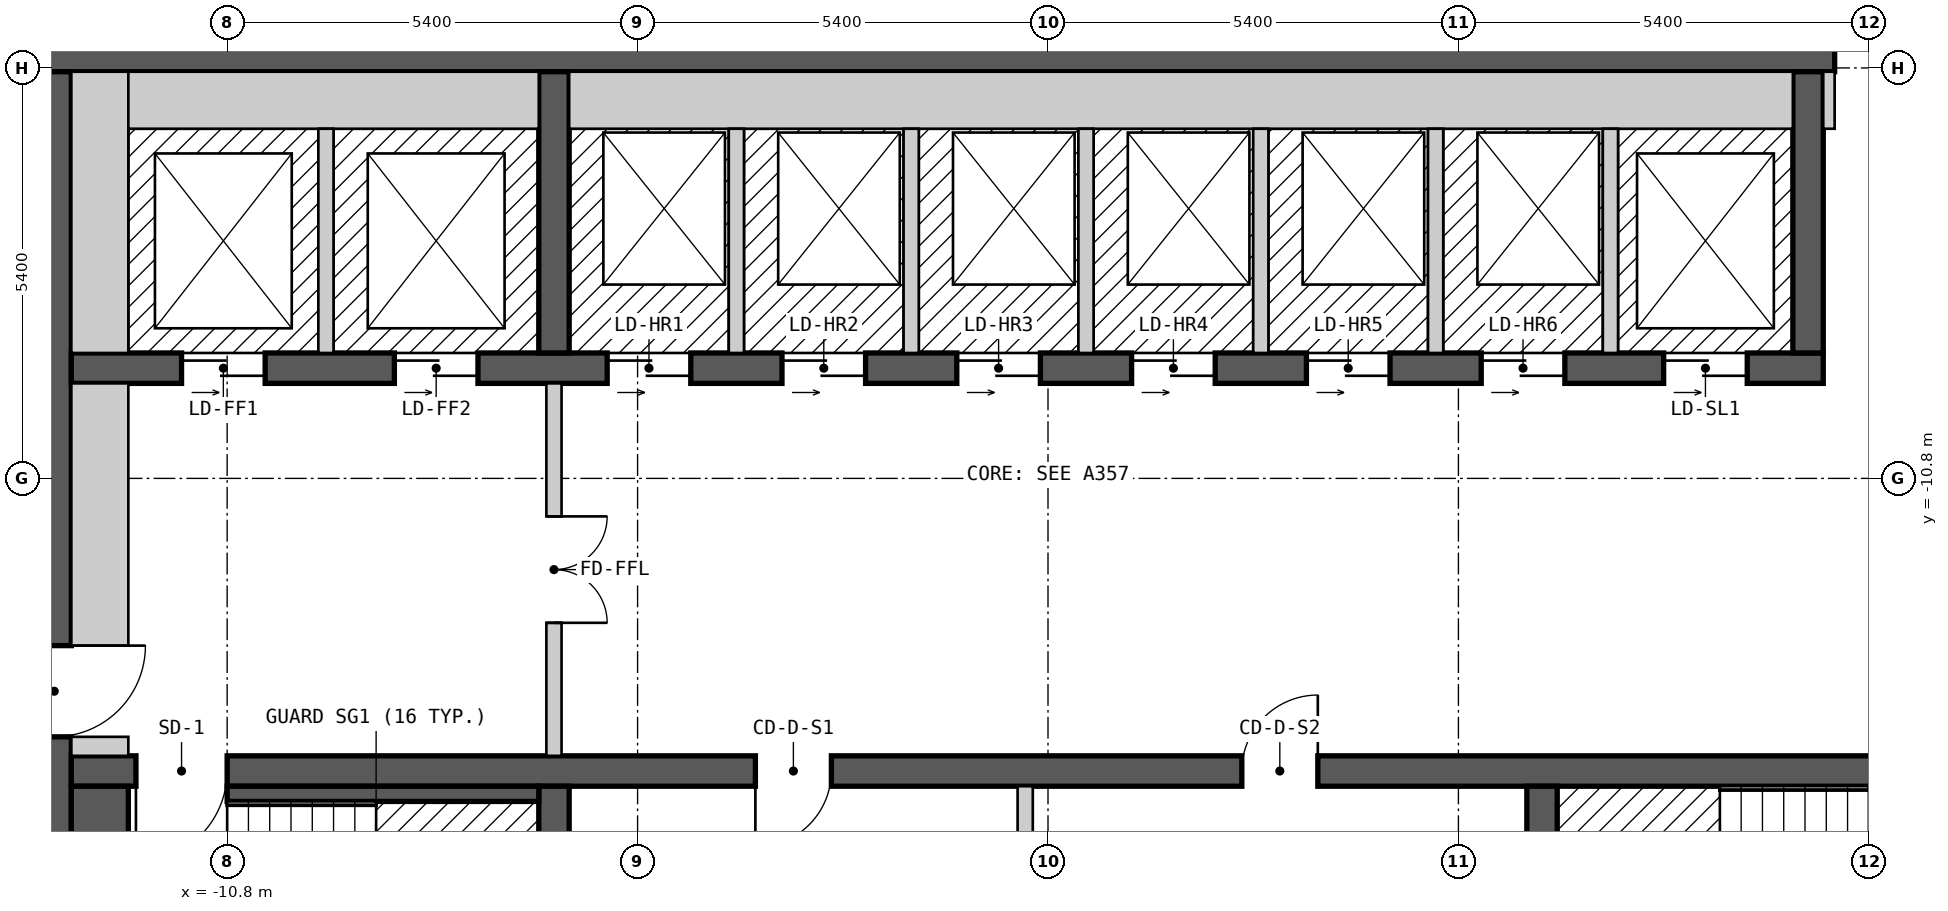
"""IFC4 building model, lengths in metres.
Left out: names, types, materials, properties, quantities, classifications, styles, units other than length and angle.
Written with IfcOpenShell. Run it as: python <this file> out.ifc"""

import sys

from ifc_helpers import new_model, si_unit, direction, frame, frame_2d, origin, place, context, subcontext, project, spatial, rectangle, extrude, element, fill, save


model = new_model("IFC4")
c1 = context("Model", 3, precision=1e-05, world=origin(), true_north=direction((0.0, 1.0)))
c2 = subcontext(c1, "Body", "Model", "MODEL_VIEW")
j1 = project(units=[si_unit("LENGTHUNIT", "METRE"), si_unit("PLANEANGLEUNIT", "RADIAN")], contexts=[c1])
p1 = place(None, origin())
s1 = spatial("IfcSite", under=j1, at=p1, CompositionType="ELEMENT")
p2 = place(p1, origin())
s2 = spatial("IfcBuilding", under=s1, at=p2, CompositionType="ELEMENT")
p3 = place(p2, frame((0.0, 0.0, 208.8)))
s3 = spatial("IfcBuildingStorey", under=s2, at=p3, CompositionType="ELEMENT", Elevation=208.8)
p4 = place(p3, frame((-13.3, -5.225, 0.0), z_axis=(0.0, 0.0, 1.0), x_axis=(1.0, 0.0, 0.0)))
e1 = element("IfcWall", 1, at=p4, inside=s3, PredefinedType="SHEAR", context=c2, shape_type="SweptSolid", body=[
    extrude(rectangle(XDim=26.6, YDim=0.45, at=frame_2d((13.3, 0.0))), origin(), (0.0, 0.0, 1.0), 2.7),
])
p5 = place(p4, frame((23.65, 0.0, 0.0)))
e2 = element("IfcOpeningElement", 2, at=p5, cuts=e1, PredefinedType="OPENING", context=c2, shape_type="SweptSolid", body=[
    extrude(rectangle(XDim=1.2, YDim=2.1, at=frame_2d((0.6, 1.05))), frame((0.0, 0.235, 0.0), z_axis=(0.0, -1.0, 0.0), x_axis=(1.0, 0.0, 0.0)), (0.0, 0.0, 1.0), 0.47),
])
p6 = place(p3, frame((-13.075, -18.55, 0.0), z_axis=(0.0, 0.0, 1.0), x_axis=(0.0, 1.0, 0.0)))
e3 = element("IfcWall", 3, at=p6, inside=s3, PredefinedType="SHEAR", context=c2, shape_type="SweptSolid", body=[
    extrude(rectangle(XDim=13.1, YDim=0.45, at=frame_2d((6.55, 0.0))), origin(), (0.0, 0.0, 1.0), 2.7),
])
p7 = place(p6, frame((4.35, 0.0, 0.0)))
e4 = element("IfcOpeningElement", 4, at=p7, cuts=e3, PredefinedType="OPENING", context=c2, shape_type="SweptSolid", body=[
    extrude(rectangle(XDim=1.2, YDim=2.1, at=frame_2d((0.6, 1.05))), frame((0.0, 0.235, 0.0), z_axis=(0.0, -1.0, 0.0), x_axis=(1.0, 0.0, 0.0)), (0.0, 0.0, 1.0), 0.47),
])
p8 = place(p3, frame((-12.85, -14.65, 0.0), z_axis=(0.0, 0.0, 1.0), x_axis=(1.0, 0.0, 0.0)))
e5 = element("IfcWall", 5, at=p8, inside=s3, PredefinedType="SHEAR", context=c2, shape_type="SweptSolid", body=[
    extrude(rectangle(XDim=25.7, YDim=0.4, at=frame_2d((12.85, 0.0))), origin(), (0.0, 0.0, 1.0), 2.7),
])
p9 = place(p8, frame((2.05, 0.0, 0.0), z_axis=(0.0, 0.0, 1.0), x_axis=(-1.0, 0.0, 0.0)))
e6 = element("IfcOpeningElement", 6, at=p9, cuts=e5, PredefinedType="OPENING", context=c2, shape_type="SweptSolid", body=[
    extrude(rectangle(XDim=1.2, YDim=2.1, at=frame_2d((0.6, 1.05))), frame((0.0, 0.21, 0.0), z_axis=(0.0, -1.0, 0.0), x_axis=(1.0, 0.0, 0.0)), (0.0, 0.0, 1.0), 0.42),
])
p10 = place(p8, frame((24.9, 0.0, 0.0), z_axis=(0.0, 0.0, 1.0), x_axis=(-1.0, 0.0, 0.0)))
e7 = element("IfcOpeningElement", 7, at=p10, cuts=e5, PredefinedType="OPENING", context=c2, shape_type="SweptSolid", body=[
    extrude(rectangle(XDim=1.2, YDim=2.1, at=frame_2d((0.6, 1.05))), frame((0.0, 0.21, 0.0), z_axis=(0.0, -1.0, 0.0), x_axis=(1.0, 0.0, 0.0)), (0.0, 0.0, 1.0), 0.42),
])
p11 = place(p8, frame((10.0, 0.0, 0.0), z_axis=(0.0, 0.0, 1.0), x_axis=(-1.0, 0.0, 0.0)))
e8 = element("IfcOpeningElement", 8, at=p11, cuts=e5, PredefinedType="OPENING", context=c2, shape_type="SweptSolid", body=[
    extrude(rectangle(XDim=1.0, YDim=2.1, at=frame_2d((0.5, 1.05))), frame((0.0, 0.21, 0.0), z_axis=(0.0, -1.0, 0.0), x_axis=(1.0, 0.0, 0.0)), (0.0, 0.0, 1.0), 0.42),
])
p12 = place(p8, frame((16.4, 0.0, 0.0), z_axis=(0.0, 0.0, 1.0), x_axis=(-1.0, 0.0, 0.0)))
e9 = element("IfcOpeningElement", 9, at=p12, cuts=e5, PredefinedType="OPENING", context=c2, shape_type="SweptSolid", body=[
    extrude(rectangle(XDim=1.0, YDim=2.1, at=frame_2d((0.5, 1.05))), frame((0.0, 0.21, 0.0), z_axis=(0.0, -1.0, 0.0), x_axis=(1.0, 0.0, 0.0)), (0.0, 0.0, 1.0), 0.42),
])
p13 = place(p3, frame((-12.85, -9.35, 0.0), z_axis=(0.0, 0.0, 1.0), x_axis=(1.0, 0.0, 0.0)))
e10 = element("IfcWall", 10, at=p13, inside=s3, PredefinedType="SHEAR", context=c2, shape_type="SweptSolid", body=[
    extrude(rectangle(XDim=23.05, YDim=0.4, at=frame_2d((11.525, 0.0))), origin(), (0.0, 0.0, 1.0), 2.7),
])
p14 = place(p13, frame((1.45, 0.0, 0.0)))
e11 = element("IfcOpeningElement", 11, at=p14, cuts=e10, PredefinedType="OPENING", context=c2, shape_type="SweptSolid", body=[
    extrude(rectangle(XDim=1.1, YDim=2.1, at=frame_2d((0.55, 1.05))), frame((0.0, 0.21, 0.0), z_axis=(0.0, -1.0, 0.0), x_axis=(1.0, 0.0, 0.0)), (0.0, 0.0, 1.0), 0.42),
])
p15 = place(p13, frame((4.25, 0.0, 0.0)))
e12 = element("IfcOpeningElement", 12, at=p15, cuts=e10, PredefinedType="OPENING", context=c2, shape_type="SweptSolid", body=[
    extrude(rectangle(XDim=1.1, YDim=2.1, at=frame_2d((0.55, 1.05))), frame((0.0, 0.21, 0.0), z_axis=(0.0, -1.0, 0.0), x_axis=(1.0, 0.0, 0.0)), (0.0, 0.0, 1.0), 0.42),
])
p16 = place(p13, frame((7.05, 0.0, 0.0)))
e13 = element("IfcOpeningElement", 13, at=p16, cuts=e10, PredefinedType="OPENING", context=c2, shape_type="SweptSolid", body=[
    extrude(rectangle(XDim=1.1, YDim=2.1, at=frame_2d((0.55, 1.05))), frame((0.0, 0.21, 0.0), z_axis=(0.0, -1.0, 0.0), x_axis=(1.0, 0.0, 0.0)), (0.0, 0.0, 1.0), 0.42),
])
p17 = place(p13, frame((9.35, 0.0, 0.0)))
e14 = element("IfcOpeningElement", 14, at=p17, cuts=e10, PredefinedType="OPENING", context=c2, shape_type="SweptSolid", body=[
    extrude(rectangle(XDim=1.1, YDim=2.1, at=frame_2d((0.55, 1.05))), frame((0.0, 0.21, 0.0), z_axis=(0.0, -1.0, 0.0), x_axis=(1.0, 0.0, 0.0)), (0.0, 0.0, 1.0), 0.42),
])
p18 = place(p13, frame((11.65, 0.0, 0.0)))
e15 = element("IfcOpeningElement", 15, at=p18, cuts=e10, PredefinedType="OPENING", context=c2, shape_type="SweptSolid", body=[
    extrude(rectangle(XDim=1.1, YDim=2.1, at=frame_2d((0.55, 1.05))), frame((0.0, 0.21, 0.0), z_axis=(0.0, -1.0, 0.0), x_axis=(1.0, 0.0, 0.0)), (0.0, 0.0, 1.0), 0.42),
])
p19 = place(p13, frame((13.95, 0.0, 0.0)))
e16 = element("IfcOpeningElement", 16, at=p19, cuts=e10, PredefinedType="OPENING", context=c2, shape_type="SweptSolid", body=[
    extrude(rectangle(XDim=1.1, YDim=2.1, at=frame_2d((0.55, 1.05))), frame((0.0, 0.21, 0.0), z_axis=(0.0, -1.0, 0.0), x_axis=(1.0, 0.0, 0.0)), (0.0, 0.0, 1.0), 0.42),
])
p20 = place(p13, frame((16.25, 0.0, 0.0)))
e17 = element("IfcOpeningElement", 17, at=p20, cuts=e10, PredefinedType="OPENING", context=c2, shape_type="SweptSolid", body=[
    extrude(rectangle(XDim=1.1, YDim=2.1, at=frame_2d((0.55, 1.05))), frame((0.0, 0.21, 0.0), z_axis=(0.0, -1.0, 0.0), x_axis=(1.0, 0.0, 0.0)), (0.0, 0.0, 1.0), 0.42),
])
p21 = place(p13, frame((18.55, 0.0, 0.0)))
e18 = element("IfcOpeningElement", 18, at=p21, cuts=e10, PredefinedType="OPENING", context=c2, shape_type="SweptSolid", body=[
    extrude(rectangle(XDim=1.1, YDim=2.1, at=frame_2d((0.55, 1.05))), frame((0.0, 0.21, 0.0), z_axis=(0.0, -1.0, 0.0), x_axis=(1.0, 0.0, 0.0)), (0.0, 0.0, 1.0), 0.42),
])
p22 = place(p13, frame((20.95, 0.0, 0.0)))
e19 = element("IfcOpeningElement", 19, at=p22, cuts=e10, PredefinedType="OPENING", context=c2, shape_type="SweptSolid", body=[
    extrude(rectangle(XDim=1.1, YDim=2.1, at=frame_2d((0.55, 1.05))), frame((0.0, 0.21, 0.0), z_axis=(0.0, -1.0, 0.0), x_axis=(1.0, 0.0, 0.0)), (0.0, 0.0, 1.0), 0.42),
])
for number, where, z_axis, x_axis in (
    (20, (-6.5, -18.55, 0.0), (0.0, 0.0, 1.0), (0.0, 1.0, 0.0)),
    (21, (6.5, -18.55, 0.0), (0.0, 0.0, 1.0), (0.0, 1.0, 0.0)),
    (22, (-6.5, -9.15, 0.0), (0.0, 0.0, 1.0), (0.0, 1.0, 0.0)),
    (23, (10.0, -9.15, 0.0), (0.0, 0.0, 1.0), (0.0, 1.0, 0.0)),
):
    element("IfcWall", number, at=place(p3, frame(where, z_axis=z_axis, x_axis=x_axis)), inside=s3, PredefinedType="SHEAR", context=c2, shape_type="SweptSolid", body=[
        extrude(rectangle(XDim=3.7, YDim=0.4, at=frame_2d((1.85, 0.0))), origin(), (0.0, 0.0, 1.0), 2.7),
    ])
p23 = place(p3, frame((-12.475, -18.55, 0.0), z_axis=(0.0, 0.0, 1.0), x_axis=(0.0, 1.0, 0.0)))
e24 = element("IfcWall", 24, at=p23, inside=s3, PredefinedType="SOLIDWALL", context=c2, shape_type="SweptSolid", body=[
    extrude(rectangle(XDim=3.7, YDim=0.75, at=frame_2d((1.85, 0.0))), origin(), (0.0, 0.0, 1.0), 2.7),
])
p24 = place(p3, frame((-12.85, -14.325, 0.0), z_axis=(0.0, 0.0, 1.0), x_axis=(1.0, 0.0, 0.0)))
e25 = element("IfcWall", 25, at=p24, inside=s3, PredefinedType="PARTITIONING", context=c2, shape_type="SweptSolid", body=[
    extrude(rectangle(XDim=0.75, YDim=0.25, at=frame_2d((0.375, 0.0))), origin(), (0.0, 0.0, 1.0), 2.7),
])
p25 = place(p3, frame((-12.475, -13.0, 0.0), z_axis=(0.0, 0.0, 1.0), x_axis=(0.0, 1.0, 0.0)))
e26 = element("IfcWall", 26, at=p25, inside=s3, PredefinedType="PARTITIONING", context=c2, shape_type="SweptSolid", body=[
    extrude(rectangle(XDim=3.45, YDim=0.75, at=frame_2d((1.725, 0.0))), origin(), (0.0, 0.0, 1.0), 2.7),
])
p26 = place(p3, frame((-12.475, -9.15, 0.0), z_axis=(0.0, 0.0, 1.0), x_axis=(0.0, 1.0, 0.0)))
e27 = element("IfcWall", 27, at=p26, inside=s3, PredefinedType="SOLIDWALL", context=c2, shape_type="SweptSolid", body=[
    extrude(rectangle(XDim=3.7, YDim=0.75, at=frame_2d((1.85, 0.0))), origin(), (0.0, 0.0, 1.0), 2.7),
])
p27 = place(p3, frame((-12.1, -5.825, 0.0), z_axis=(0.0, 0.0, 1.0), x_axis=(1.0, 0.0, 0.0)))
e28 = element("IfcWall", 28, at=p27, inside=s3, PredefinedType="SOLIDWALL", context=c2, shape_type="SweptSolid", body=[
    extrude(rectangle(XDim=5.4, YDim=0.75, at=frame_2d((2.7, 0.0))), origin(), (0.0, 0.0, 1.0), 2.7),
])
p28 = place(p3, frame((-10.8, -14.95, 0.0), z_axis=(0.0, 0.0, 1.0), x_axis=(1.0, 0.0, 0.0)))
e29 = element("IfcWall", 29, at=p28, inside=s3, PredefinedType="SOLIDWALL", context=c2, shape_type="SweptSolid", body=[
    extrude(rectangle(XDim=4.1, YDim=0.2, at=frame_2d((2.05, 0.0))), origin(), (0.0, 0.0, 1.0), 2.7),
])
p29 = place(p3, frame((-9.5, -9.15, 0.0), z_axis=(0.0, 0.0, 1.0), x_axis=(0.0, 1.0, 0.0)))
e30 = element("IfcWall", 30, at=p29, inside=s3, PredefinedType="SOLIDWALL", context=c2, shape_type="SweptSolid", body=[
    extrude(rectangle(XDim=2.95, YDim=0.2, at=frame_2d((1.475, 0.0))), origin(), (0.0, 0.0, 1.0), 2.7),
])
p30 = place(p3, frame((-6.5, -14.45, 0.0), z_axis=(0.0, 0.0, 1.0), x_axis=(0.0, 1.0, 0.0)))
e31 = element("IfcWall", 31, at=p30, inside=s3, PredefinedType="PARTITIONING", context=c2, shape_type="SweptSolid", body=[
    extrude(rectangle(XDim=4.9, YDim=0.2, at=frame_2d((2.45, 0.0))), origin(), (0.0, 0.0, 1.0), 2.7),
])
p31 = place(p30, frame((3.15, 0.0, 0.0), z_axis=(0.0, 0.0, 1.0), x_axis=(-1.0, 0.0, 0.0)))
e32 = element("IfcOpeningElement", 32, at=p31, cuts=e31, PredefinedType="OPENING", context=c2, shape_type="SweptSolid", body=[
    extrude(rectangle(XDim=1.4, YDim=2.1, at=frame_2d((0.7, 1.05))), frame((0.0, 0.11, 0.0), z_axis=(0.0, -1.0, 0.0), x_axis=(1.0, 0.0, 0.0)), (0.0, 0.0, 1.0), 0.22),
])
p32 = place(p3, frame((-6.3, -5.825, 0.0), z_axis=(0.0, 0.0, 1.0), x_axis=(1.0, 0.0, 0.0)))
e33 = element("IfcWall", 33, at=p32, inside=s3, PredefinedType="SOLIDWALL", context=c2, shape_type="SweptSolid", body=[
    extrude(rectangle(XDim=16.1, YDim=0.75, at=frame_2d((8.05, 0.0))), origin(), (0.0, 0.0, 1.0), 2.7),
])
for number, where, z_axis, x_axis in (
    (34, (-4.1, -9.15, 0.0), (0.0, 0.0, 1.0), (0.0, 1.0, 0.0)),
    (35, (-1.8, -9.15, 0.0), (0.0, 0.0, 1.0), (0.0, 1.0, 0.0)),
):
    element("IfcWall", number, at=place(p3, frame(where, z_axis=z_axis, x_axis=x_axis)), inside=s3, PredefinedType="SOLIDWALL", context=c2, shape_type="SweptSolid", body=[
        extrude(rectangle(XDim=2.95, YDim=0.2, at=frame_2d((1.475, 0.0))), origin(), (0.0, 0.0, 1.0), 2.7),
    ])
p33 = place(p3, frame((-0.3, -17.8, 0.0), z_axis=(0.0, 0.0, 1.0), x_axis=(0.0, 1.0, 0.0)))
e36 = element("IfcWall", 36, at=p33, inside=s3, PredefinedType="PARTITIONING", context=c2, shape_type="SweptSolid", body=[
    extrude(rectangle(XDim=2.95, YDim=0.2, at=frame_2d((1.475, 0.0))), origin(), (0.0, 0.0, 1.0), 2.7),
])
for number, where, z_axis, x_axis in (
    (37, (0.5, -9.15, 0.0), (0.0, 0.0, 1.0), (0.0, 1.0, 0.0)),
    (38, (2.8, -9.15, 0.0), (0.0, 0.0, 1.0), (0.0, 1.0, 0.0)),
    (39, (5.1, -9.15, 0.0), (0.0, 0.0, 1.0), (0.0, 1.0, 0.0)),
    (40, (7.4, -9.15, 0.0), (0.0, 0.0, 1.0), (0.0, 1.0, 0.0)),
):
    element("IfcWall", number, at=place(p3, frame(where, z_axis=z_axis, x_axis=x_axis)), inside=s3, PredefinedType="SOLIDWALL", context=c2, shape_type="SweptSolid", body=[
        extrude(rectangle(XDim=2.95, YDim=0.2, at=frame_2d((1.475, 0.0))), origin(), (0.0, 0.0, 1.0), 2.7),
    ])
p34 = place(p3, frame((10.275, -6.2, 0.0), z_axis=(0.0, 0.0, 1.0), x_axis=(0.0, 1.0, 0.0)))
e41 = element("IfcWall", 41, at=p34, inside=s3, PredefinedType="PARTITIONING", context=c2, shape_type="SweptSolid", body=[
    extrude(rectangle(XDim=0.75, YDim=0.15, at=frame_2d((0.375, 0.0))), origin(), (0.0, 0.0, 1.0), 2.7),
])
p35 = place(p14, origin())
e42 = element("IfcDoor", 42, at=p35, inside=s3, OperationType="DOUBLE_DOOR_SLIDING", PredefinedType="DOOR", context=c2, shape_type="SweptSolid", body=[
    extrude(rectangle(XDim=1.1, YDim=2.1, at=frame_2d((0.55, 1.05))), frame((0.0, 0.025, 0.0), z_axis=(0.0, -1.0, 0.0), x_axis=(1.0, 0.0, 0.0)), (0.0, 0.0, 1.0), 0.05),
])
fill(e11, e42)
p36 = place(p15, origin())
e43 = element("IfcDoor", 43, at=p36, inside=s3, OperationType="DOUBLE_DOOR_SLIDING", PredefinedType="DOOR", context=c2, shape_type="SweptSolid", body=[
    extrude(rectangle(XDim=1.1, YDim=2.1, at=frame_2d((0.55, 1.05))), frame((0.0, 0.025, 0.0), z_axis=(0.0, -1.0, 0.0), x_axis=(1.0, 0.0, 0.0)), (0.0, 0.0, 1.0), 0.05),
])
fill(e12, e43)
p37 = place(p16, origin())
e44 = element("IfcDoor", 44, at=p37, inside=s3, OperationType="DOUBLE_DOOR_SLIDING", PredefinedType="DOOR", context=c2, shape_type="SweptSolid", body=[
    extrude(rectangle(XDim=1.1, YDim=2.1, at=frame_2d((0.55, 1.05))), frame((0.0, 0.025, 0.0), z_axis=(0.0, -1.0, 0.0), x_axis=(1.0, 0.0, 0.0)), (0.0, 0.0, 1.0), 0.05),
])
fill(e13, e44)
p38 = place(p17, origin())
e45 = element("IfcDoor", 45, at=p38, inside=s3, OperationType="DOUBLE_DOOR_SLIDING", PredefinedType="DOOR", context=c2, shape_type="SweptSolid", body=[
    extrude(rectangle(XDim=1.1, YDim=2.1, at=frame_2d((0.55, 1.05))), frame((0.0, 0.025, 0.0), z_axis=(0.0, -1.0, 0.0), x_axis=(1.0, 0.0, 0.0)), (0.0, 0.0, 1.0), 0.05),
])
fill(e14, e45)
p39 = place(p18, origin())
e46 = element("IfcDoor", 46, at=p39, inside=s3, OperationType="DOUBLE_DOOR_SLIDING", PredefinedType="DOOR", context=c2, shape_type="SweptSolid", body=[
    extrude(rectangle(XDim=1.1, YDim=2.1, at=frame_2d((0.55, 1.05))), frame((0.0, 0.025, 0.0), z_axis=(0.0, -1.0, 0.0), x_axis=(1.0, 0.0, 0.0)), (0.0, 0.0, 1.0), 0.05),
])
fill(e15, e46)
p40 = place(p19, origin())
e47 = element("IfcDoor", 47, at=p40, inside=s3, OperationType="DOUBLE_DOOR_SLIDING", PredefinedType="DOOR", context=c2, shape_type="SweptSolid", body=[
    extrude(rectangle(XDim=1.1, YDim=2.1, at=frame_2d((0.55, 1.05))), frame((0.0, 0.025, 0.0), z_axis=(0.0, -1.0, 0.0), x_axis=(1.0, 0.0, 0.0)), (0.0, 0.0, 1.0), 0.05),
])
fill(e16, e47)
p41 = place(p20, origin())
e48 = element("IfcDoor", 48, at=p41, inside=s3, OperationType="DOUBLE_DOOR_SLIDING", PredefinedType="DOOR", context=c2, shape_type="SweptSolid", body=[
    extrude(rectangle(XDim=1.1, YDim=2.1, at=frame_2d((0.55, 1.05))), frame((0.0, 0.025, 0.0), z_axis=(0.0, -1.0, 0.0), x_axis=(1.0, 0.0, 0.0)), (0.0, 0.0, 1.0), 0.05),
])
fill(e17, e48)
p42 = place(p21, origin())
e49 = element("IfcDoor", 49, at=p42, inside=s3, OperationType="DOUBLE_DOOR_SLIDING", PredefinedType="DOOR", context=c2, shape_type="SweptSolid", body=[
    extrude(rectangle(XDim=1.1, YDim=2.1, at=frame_2d((0.55, 1.05))), frame((0.0, 0.025, 0.0), z_axis=(0.0, -1.0, 0.0), x_axis=(1.0, 0.0, 0.0)), (0.0, 0.0, 1.0), 0.05),
])
fill(e18, e49)
p43 = place(p22, origin())
e50 = element("IfcDoor", 50, at=p43, inside=s3, OperationType="DOUBLE_DOOR_SLIDING", PredefinedType="DOOR", context=c2, shape_type="SweptSolid", body=[
    extrude(rectangle(XDim=1.1, YDim=2.1, at=frame_2d((0.55, 1.05))), frame((0.0, 0.025, 0.0), z_axis=(0.0, -1.0, 0.0), x_axis=(1.0, 0.0, 0.0)), (0.0, 0.0, 1.0), 0.05),
])
fill(e19, e50)
p44 = place(p9, origin())
e51 = element("IfcDoor", 51, at=p44, inside=s3, OperationType="SINGLE_SWING_RIGHT", PredefinedType="DOOR", context=c2, shape_type="SweptSolid", body=[
    extrude(rectangle(XDim=1.2, YDim=2.1, at=frame_2d((0.6, 1.05))), frame((0.0, 0.025, 0.0), z_axis=(0.0, -1.0, 0.0), x_axis=(1.0, 0.0, 0.0)), (0.0, 0.0, 1.0), 0.05),
])
fill(e6, e51)
p45 = place(p7, origin())
e52 = element("IfcDoor", 52, at=p45, inside=s3, OperationType="SINGLE_SWING_RIGHT", PredefinedType="DOOR", context=c2, shape_type="SweptSolid", body=[
    extrude(rectangle(XDim=1.2, YDim=2.1, at=frame_2d((0.6, 1.05))), frame((0.0, 0.025, 0.0), z_axis=(0.0, -1.0, 0.0), x_axis=(1.0, 0.0, 0.0)), (0.0, 0.0, 1.0), 0.05),
])
fill(e4, e52)
p46 = place(p31, origin())
e53 = element("IfcDoor", 53, at=p46, inside=s3, OperationType="DOUBLE_DOOR_SINGLE_SWING", PredefinedType="DOOR", context=c2, shape_type="SweptSolid", body=[
    extrude(rectangle(XDim=1.4, YDim=2.1, at=frame_2d((0.7, 1.05))), frame((0.0, 0.025, 0.0), z_axis=(0.0, -1.0, 0.0), x_axis=(1.0, 0.0, 0.0)), (0.0, 0.0, 1.0), 0.05),
])
fill(e32, e53)
p47 = place(p5, origin())
e54 = element("IfcDoor", 54, at=p47, inside=s3, OperationType="DOUBLE_DOOR_SINGLE_SWING", PredefinedType="DOOR", context=c2, shape_type="SweptSolid", body=[
    extrude(rectangle(XDim=1.2, YDim=2.1, at=frame_2d((0.6, 1.05))), frame((0.0, 0.025, 0.0), z_axis=(0.0, -1.0, 0.0), x_axis=(1.0, 0.0, 0.0)), (0.0, 0.0, 1.0), 0.05),
])
fill(e2, e54)
p48 = place(p11, origin())
e55 = element("IfcDoor", 55, at=p48, inside=s3, OperationType="SINGLE_SWING_RIGHT", PredefinedType="DOOR", context=c2, shape_type="SweptSolid", body=[
    extrude(rectangle(XDim=1.0, YDim=2.1, at=frame_2d((0.5, 1.05))), frame((0.0, 0.025, 0.0), z_axis=(0.0, -1.0, 0.0), x_axis=(1.0, 0.0, 0.0)), (0.0, 0.0, 1.0), 0.05),
])
fill(e8, e55)
p49 = place(p12, origin())
e56 = element("IfcDoor", 56, at=p49, inside=s3, OperationType="SINGLE_SWING_LEFT", PredefinedType="DOOR", context=c2, shape_type="SweptSolid", body=[
    extrude(rectangle(XDim=1.0, YDim=2.1, at=frame_2d((0.5, 1.05))), frame((0.0, 0.025, 0.0), z_axis=(0.0, -1.0, 0.0), x_axis=(1.0, 0.0, 0.0)), (0.0, 0.0, 1.0), 0.05),
])
fill(e9, e56)
save(model, sys.argv[1])
